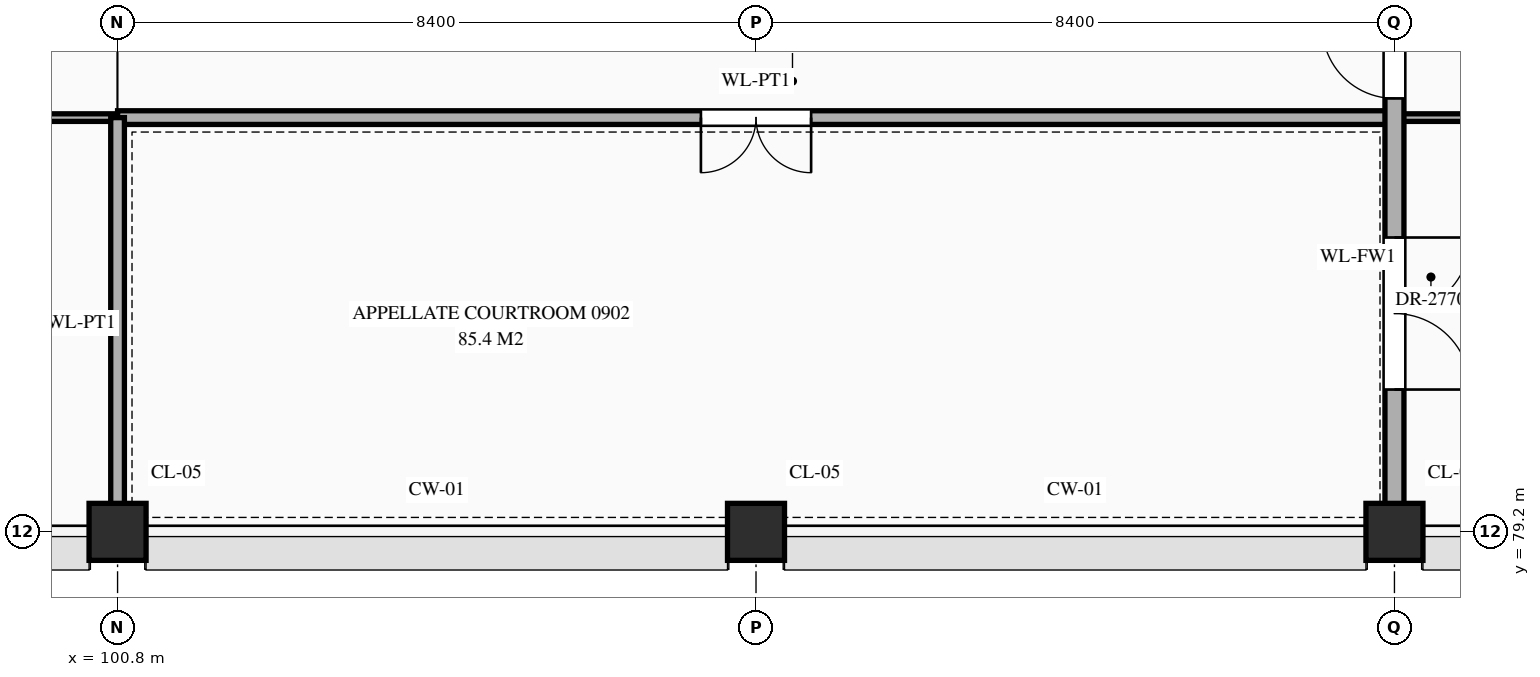
"""IFC4 building model, lengths in metres.
Left out: names, types, materials, properties, quantities, classifications, styles, units other than length and angle.
Written with IfcOpenShell. Run it as: python <this file> out.ifc"""

import sys

from ifc_helpers import new_model, si_unit, direction, frame, frame_2d, origin, origin_2d, place, context, subcontext, project, spatial, rectangle, extrude, element, fill, save


model = new_model("IFC4")
c1 = context("Model", 3, precision=1e-05, world=origin(), true_north=direction((0.0, 1.0)))
c2 = subcontext(c1, "Body", "Model", "MODEL_VIEW")
j1 = project(units=[si_unit("LENGTHUNIT", "METRE"), si_unit("PLANEANGLEUNIT", "RADIAN")], contexts=[c1])
p1 = place(None, origin())
s1 = spatial("IfcSite", under=j1, at=p1, CompositionType="ELEMENT")
p2 = place(p1, origin())
s2 = spatial("IfcBuilding", under=s1, at=p2, CompositionType="ELEMENT")
p3 = place(p2, frame((0.0, 0.0, 39.3)))
s3 = spatial("IfcBuildingStorey", under=s2, at=p3, CompositionType="ELEMENT", Elevation=39.3)
for number, where, z_axis, x_axis in (
    (1, (100.8, 79.2, 0.0), (0.0, 0.0, 1.0), (1.0, 0.0, 0.0)),
    (2, (109.2, 79.2, 0.0), (0.0, 0.0, 1.0), (1.0, 0.0, 0.0)),
    (3, (117.6, 79.2, 0.0), (0.0, 0.0, 1.0), (1.0, 0.0, 0.0)),
):
    element("IfcColumn", number, at=place(p3, frame(where, z_axis=z_axis, x_axis=x_axis)), inside=s3, PredefinedType="COLUMN", context=c2, shape_type="SweptSolid", body=[
        extrude(rectangle(XDim=0.75, YDim=0.75, at=origin_2d()), origin(), (0.0, 0.0, 1.0), 4.2),
    ])
p4 = place(p3, frame((67.2, 84.65, 0.0), z_axis=(0.0, 0.0, 1.0), x_axis=(1.0, 0.0, 0.0)))
e4 = element("IfcWall", 4, at=p4, inside=s3, PredefinedType="STANDARD", context=c2, shape_type="SweptSolid", body=[
    extrude(rectangle(XDim=33.6, YDim=0.1, at=frame_2d((16.8, 0.0))), origin(), (0.0, 0.0, 1.0), 3.95),
])
p5 = place(p4, frame((7.575, 0.0, 0.0)))
e5 = element("IfcOpeningElement", 5, at=p5, cuts=e4, PredefinedType="OPENING", context=c2, shape_type="SweptSolid", body=[
    extrude(rectangle(XDim=1.65, YDim=2.4, at=frame_2d((0.825, 1.2))), frame((0.0, 0.062, 0.0), z_axis=(0.0, -1.0, 0.0), x_axis=(1.0, 0.0, 0.0)), (0.0, 0.0, 1.0), 0.124),
])
p6 = place(p4, frame((24.35, 0.0, 0.0)))
e6 = element("IfcOpeningElement", 6, at=p6, cuts=e4, PredefinedType="OPENING", context=c2, shape_type="SweptSolid", body=[
    extrude(rectangle(XDim=1.7, YDim=2.45, at=frame_2d((0.85, 1.225))), frame((0.0, 0.062, 0.0), z_axis=(0.0, -1.0, 0.0), x_axis=(1.0, 0.0, 0.0)), (0.0, 0.0, 1.0), 0.124),
])
p7 = place(p3, frame((100.8, 84.65, 0.0), z_axis=(0.0, 0.0, 1.0), x_axis=(1.0, 0.0, 0.0)))
e7 = element("IfcWall", 7, at=p7, inside=s3, PredefinedType="STANDARD", context=c2, shape_type="SweptSolid", body=[
    extrude(rectangle(XDim=16.8, YDim=0.18, at=frame_2d((8.4, 0.0))), origin(), (0.0, 0.0, 1.0), 3.95),
])
p8 = place(p7, frame((7.675, 0.0, 0.0)))
e8 = element("IfcOpeningElement", 8, at=p8, cuts=e7, PredefinedType="OPENING", context=c2, shape_type="SweptSolid", body=[
    extrude(rectangle(XDim=1.45, YDim=2.3, at=frame_2d((0.725, 1.15))), frame((0.0, 0.102, 0.0), z_axis=(0.0, -1.0, 0.0), x_axis=(1.0, 0.0, 0.0)), (0.0, 0.0, 1.0), 0.204),
])
p9 = place(p3, frame((117.6, 84.65, 0.0), z_axis=(0.0, 0.0, 1.0), x_axis=(1.0, 0.0, 0.0)))
e9 = element("IfcWall", 9, at=p9, inside=s3, PredefinedType="STANDARD", context=c2, shape_type="SweptSolid", body=[
    extrude(rectangle(XDim=8.36, YDim=0.1, at=frame_2d((4.18, 0.0))), origin(), (0.0, 0.0, 1.0), 3.95),
])
p10 = place(p9, frame((3.23, 0.0, 0.0)))
e10 = element("IfcOpeningElement", 10, at=p10, cuts=e9, PredefinedType="OPENING", context=c2, shape_type="SweptSolid", body=[
    extrude(rectangle(XDim=1.9, YDim=2.5, at=frame_2d((0.95, 1.25))), frame((0.0, 0.062, 0.0), z_axis=(0.0, -1.0, 0.0), x_axis=(1.0, 0.0, 0.0)), (0.0, 0.0, 1.0), 0.124),
])
p11 = place(p3, frame((100.8, 79.24, 0.0), z_axis=(0.0, 0.0, 1.0), x_axis=(0.0, 1.0, 0.0)))
e11 = element("IfcWall", 11, at=p11, inside=s3, PredefinedType="STANDARD", context=c2, shape_type="SweptSolid", body=[
    extrude(rectangle(XDim=5.41, YDim=0.18, at=frame_2d((2.705, 0.0))), origin(), (0.0, 0.0, 1.0), 3.2),
])
p12 = place(p3, frame((117.6, 79.24, 0.0), z_axis=(0.0, 0.0, 1.0), x_axis=(0.0, 1.0, 0.0)))
e12 = element("IfcWall", 12, at=p12, inside=s3, PredefinedType="STANDARD", context=c2, shape_type="SweptSolid", body=[
    extrude(rectangle(XDim=7.16, YDim=0.25, at=frame_2d((3.58, 0.0))), origin(), (0.0, 0.0, 1.0), 3.2),
])
p13 = place(p12, frame((5.663, 0.0, 0.0)))
e13 = element("IfcOpeningElement", 13, at=p13, cuts=e12, PredefinedType="OPENING", context=c2, shape_type="SweptSolid", body=[
    extrude(rectangle(XDim=0.95, YDim=2.15, at=frame_2d((0.475, 1.075))), frame((0.0, 0.137, 0.0), z_axis=(0.0, -1.0, 0.0), x_axis=(1.0, 0.0, 0.0)), (0.0, 0.0, 1.0), 0.274),
])
p14 = place(p12, frame((1.833, 0.0, 0.0)))
e14 = element("IfcOpeningElement", 14, at=p14, cuts=e12, PredefinedType="OPENING", context=c2, shape_type="SweptSolid", body=[
    extrude(rectangle(XDim=2.0, YDim=2.4, at=frame_2d((1.0, 1.2))), frame((0.0, 0.137, 0.0), z_axis=(0.0, -1.0, 0.0), x_axis=(1.0, 0.0, 0.0)), (0.0, 0.0, 1.0), 0.274),
])
p15 = place(p13, origin())
e15 = element("IfcDoor", 15, at=p15, inside=s3, OperationType="SINGLE_SWING_RIGHT", PredefinedType="DOOR", context=c2, shape_type="SweptSolid", body=[
    extrude(rectangle(XDim=0.95, YDim=2.15, at=frame_2d((0.475, 1.075))), frame((0.0, 0.025, 0.0), z_axis=(0.0, -1.0, 0.0), x_axis=(1.0, 0.0, 0.0)), (0.0, 0.0, 1.0), 0.05),
])
fill(e13, e15)
p16 = place(p8, frame((1.45, 0.0, 0.0), z_axis=(0.0, 0.0, 1.0), x_axis=(-1.0, 0.0, 0.0)))
e16 = element("IfcDoor", 16, at=p16, inside=s3, OperationType="DOUBLE_DOOR_SINGLE_SWING", PredefinedType="DOOR", context=c2, shape_type="SweptSolid", body=[
    extrude(rectangle(XDim=1.45, YDim=2.3, at=frame_2d((0.725, 1.15))), frame((0.0, 0.025, 0.0), z_axis=(0.0, -1.0, 0.0), x_axis=(1.0, 0.0, 0.0)), (0.0, 0.0, 1.0), 0.05),
])
fill(e8, e16)
p17 = place(p14, frame((2.0, 0.0, 0.0), z_axis=(0.0, 0.0, 1.0), x_axis=(-1.0, 0.0, 0.0)))
e17 = element("IfcDoor", 17, at=p17, inside=s3, OperationType="DOUBLE_DOOR_SINGLE_SWING", PredefinedType="DOOR", context=c2, shape_type="SweptSolid", body=[
    extrude(rectangle(XDim=2.0, YDim=2.4, at=frame_2d((1.0, 1.2))), frame((0.0, 0.025, 0.0), z_axis=(0.0, -1.0, 0.0), x_axis=(1.0, 0.0, 0.0)), (0.0, 0.0, 1.0), 0.05),
])
fill(e14, e17)
save(model, sys.argv[1])
